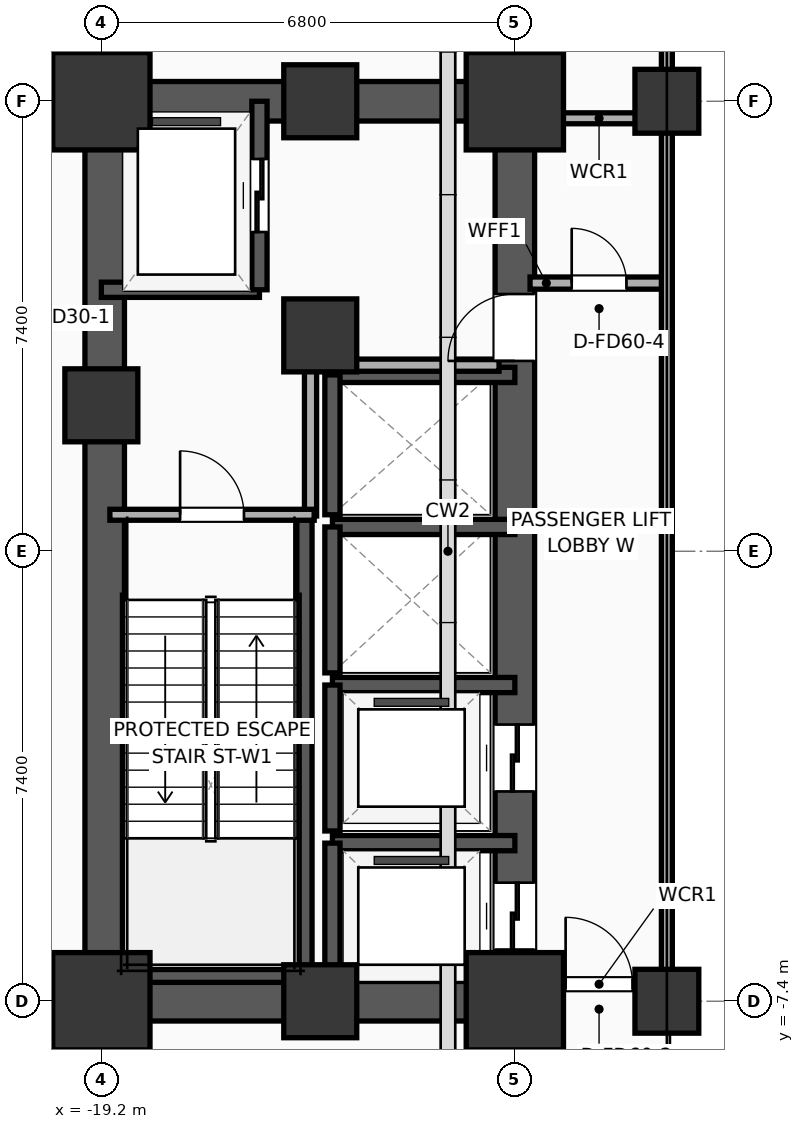
"""IFC4 building model, lengths in metres.
Left out: names, types, materials, properties, quantities, classifications, styles, units other than length and angle.
Written with IfcOpenShell. Run it as: python <this file> out.ifc"""

import sys

from ifc_helpers import new_model, si_unit, direction, frame, frame_2d, origin, origin_2d, place, context, subcontext, project, spatial, rectangle, extrude, element, fill, save


model = new_model("IFC4")
c1 = context("Model", 3, precision=1e-05, world=origin(), true_north=direction((0.0, 1.0)))
c2 = subcontext(c1, "Body", "Model", "MODEL_VIEW")
j1 = project(units=[si_unit("LENGTHUNIT", "METRE"), si_unit("PLANEANGLEUNIT", "RADIAN")], contexts=[c1])
p1 = place(None, origin())
s1 = spatial("IfcSite", under=j1, at=p1, CompositionType="ELEMENT")
p2 = place(p1, origin())
s2 = spatial("IfcBuilding", under=s1, at=p2, CompositionType="ELEMENT")
p3 = place(p2, frame((0.0, 0.0, 15.6)))
s3 = spatial("IfcBuildingStorey", under=s2, at=p3, CompositionType="ELEMENT", Elevation=15.6)
p4 = place(p3, frame((-19.2, -7.4, 0.0), z_axis=(0.0, 0.0, 1.0), x_axis=(1.0, 0.0, 0.0)))
e1 = element("IfcColumn", 1, at=p4, inside=s3, PredefinedType="COLUMN", context=c2, shape_type="SweptSolid", body=[
    extrude(rectangle(XDim=1.6, YDim=1.6, at=origin_2d()), origin(), (0.0, 0.0, 1.0), 5.2),
])
p5 = place(p3, frame((-19.2, 2.4, 0.0), z_axis=(0.0, 0.0, 1.0), x_axis=(1.0, 0.0, 0.0)))
e2 = element("IfcColumn", 2, at=p5, inside=s3, PredefinedType="COLUMN", context=c2, shape_type="SweptSolid", body=[
    extrude(rectangle(XDim=1.2, YDim=1.2, at=origin_2d()), origin(), (0.0, 0.0, 1.0), 5.2),
])
p6 = place(p3, frame((-19.2, 7.4, 0.0), z_axis=(0.0, 0.0, 1.0), x_axis=(1.0, 0.0, 0.0)))
e3 = element("IfcColumn", 3, at=p6, inside=s3, PredefinedType="COLUMN", context=c2, shape_type="SweptSolid", body=[
    extrude(rectangle(XDim=1.6, YDim=1.6, at=origin_2d()), origin(), (0.0, 0.0, 1.0), 5.2),
])
for number, where, z_axis, x_axis in (
    (4, (-15.6, -7.4, 0.0), (0.0, 0.0, 1.0), (1.0, 0.0, 0.0)),
    (5, (-15.6, 7.4, 0.0), (0.0, 0.0, 1.0), (1.0, 0.0, 0.0)),
):
    element("IfcColumn", number, at=place(p3, frame(where, z_axis=z_axis, x_axis=x_axis)), inside=s3, PredefinedType="COLUMN", context=c2, shape_type="SweptSolid", body=[
        extrude(rectangle(XDim=1.2, YDim=1.2, at=origin_2d()), origin(), (0.0, 0.0, 1.0), 5.2),
    ])
p7 = place(p3, frame((-12.4, -7.4, 0.0), z_axis=(0.0, 0.0, 1.0), x_axis=(1.0, 0.0, 0.0)))
e6 = element("IfcColumn", 6, at=p7, inside=s3, PredefinedType="COLUMN", context=c2, shape_type="SweptSolid", body=[
    extrude(rectangle(XDim=1.6, YDim=1.6, at=origin_2d()), origin(), (0.0, 0.0, 1.0), 5.2),
])
p8 = place(p3, frame((-15.6, 3.55, 0.0), z_axis=(0.0, 0.0, 1.0), x_axis=(1.0, 0.0, 0.0)))
e7 = element("IfcColumn", 7, at=p8, inside=s3, PredefinedType="COLUMN", context=c2, shape_type="SweptSolid", body=[
    extrude(rectangle(XDim=1.2, YDim=1.2, at=origin_2d()), origin(), (0.0, 0.0, 1.0), 5.2),
])
p9 = place(p3, frame((-12.4, 7.4, 0.0), z_axis=(0.0, 0.0, 1.0), x_axis=(1.0, 0.0, 0.0)))
e8 = element("IfcColumn", 8, at=p9, inside=s3, PredefinedType="COLUMN", context=c2, shape_type="SweptSolid", body=[
    extrude(rectangle(XDim=1.6, YDim=1.6, at=origin_2d()), origin(), (0.0, 0.0, 1.0), 5.2),
])
for number, where, z_axis, x_axis in (
    (9, (-19.525, -7.4, 0.0), (0.0, 0.0, 1.0), (1.0, 0.0, 0.0)),
    (10, (-19.525, 7.4, 0.0), (0.0, 0.0, 1.0), (1.0, 0.0, 0.0)),
):
    element("IfcWall", number, at=place(p3, frame(where, z_axis=z_axis, x_axis=x_axis)), inside=s3, PredefinedType="SHEAR", context=c2, shape_type="SweptSolid", body=[
        extrude(rectangle(XDim=7.45, YDim=0.65, at=frame_2d((3.725, 0.0))), origin(), (0.0, 0.0, 1.0), 4.8),
    ])
p10 = place(p3, frame((-19.145, -7.4, 0.0), z_axis=(0.0, 0.0, 1.0), x_axis=(0.0, 1.0, 0.0)))
e11 = element("IfcWall", 11, at=p10, inside=s3, PredefinedType="SHEAR", context=c2, shape_type="SweptSolid", body=[
    extrude(rectangle(XDim=14.8, YDim=0.65, at=frame_2d((7.4, 0.0))), origin(), (0.0, 0.0, 1.0), 4.8),
])
p11 = place(p3, frame((-12.4, -7.4, 0.0), z_axis=(0.0, 0.0, 1.0), x_axis=(0.0, 1.0, 0.0)))
e12 = element("IfcWall", 12, at=p11, inside=s3, PredefinedType="SHEAR", context=c2, shape_type="SweptSolid", body=[
    extrude(rectangle(XDim=14.8, YDim=0.65, at=frame_2d((7.4, 0.0))), origin(), (0.0, 0.0, 1.0), 4.8),
])
p12 = place(p11, frame((0.85, 0.0, 0.0)))
e13 = element("IfcOpeningElement", 13, at=p12, cuts=e12, PredefinedType="OPENING", context=c2, shape_type="SweptSolid", body=[
    extrude(rectangle(XDim=1.1, YDim=2.05, at=frame_2d((0.55, 1.025))), frame((0.0, 0.335, 0.0), z_axis=(0.0, -1.0, 0.0), x_axis=(1.0, 0.0, 0.0)), (0.0, 0.0, 1.0), 0.67),
])
p13 = place(p11, frame((3.45, 0.0, 0.0)))
e14 = element("IfcOpeningElement", 14, at=p13, cuts=e12, PredefinedType="OPENING", context=c2, shape_type="SweptSolid", body=[
    extrude(rectangle(XDim=1.1, YDim=2.05, at=frame_2d((0.55, 1.025))), frame((0.0, 0.335, 0.0), z_axis=(0.0, -1.0, 0.0), x_axis=(1.0, 0.0, 0.0)), (0.0, 0.0, 1.0), 0.67),
])
p14 = place(p11, frame((10.53, 0.0, 0.0)))
e15 = element("IfcOpeningElement", 15, at=p14, cuts=e12, PredefinedType="OPENING", context=c2, shape_type="SweptSolid", body=[
    extrude(rectangle(XDim=1.1, YDim=2.05, at=frame_2d((0.55, 1.025))), frame((0.0, 0.335, 0.0), z_axis=(0.0, -1.0, 0.0), x_axis=(1.0, 0.0, 0.0)), (0.0, 0.0, 1.0), 0.67),
])
p15 = place(p3, frame((-15.86, -7.085, 0.0), z_axis=(0.0, 0.0, 1.0), x_axis=(0.0, 1.0, 0.0)))
e16 = element("IfcWall", 16, at=p15, inside=s3, PredefinedType="SOLIDWALL", context=c2, shape_type="SweptSolid", body=[
    extrude(rectangle(XDim=7.685, YDim=0.25, at=frame_2d((3.843, 0.0))), origin(), (0.0, 0.0, 1.0), 4.8),
])
p16 = place(p3, frame((-19.2, -6.965, 0.0), z_axis=(0.0, 0.0, 1.0), x_axis=(1.0, 0.0, 0.0)))
e17 = element("IfcWall", 17, at=p16, inside=s3, PredefinedType="SOLIDWALL", context=c2, shape_type="SweptSolid", body=[
    extrude(rectangle(XDim=3.46, YDim=0.25, at=frame_2d((1.73, 0.0))), origin(), (0.0, 0.0, 1.0), 4.8),
])
for number, where, z_axis, x_axis in (
    (18, (-9.9, -7.4, 0.0), (0.0, 0.0, 1.0), (1.0, 0.0, 0.0)),
    (19, (-9.9, 7.4, 0.0), (0.0, 0.0, 1.0), (1.0, 0.0, 0.0)),
):
    element("IfcColumn", number, at=place(p3, frame(where, z_axis=z_axis, x_axis=x_axis)), inside=s3, PredefinedType="COLUMN", context=c2, shape_type="SweptSolid", body=[
        extrude(rectangle(XDim=1.05, YDim=1.05, at=origin_2d()), origin(), (0.0, 0.0, 1.0), 5.2),
    ])
p17 = place(p3, frame((-19.2, 4.3, 0.0), z_axis=(0.0, 0.0, 1.0), x_axis=(1.0, 0.0, 0.0)))
e20 = element("IfcWall", 20, at=p17, inside=s3, PredefinedType="SOLIDWALL", context=c2, shape_type="SweptSolid", body=[
    extrude(rectangle(XDim=2.6, YDim=0.25, at=frame_2d((1.3, 0.0))), origin(), (0.0, 0.0, 1.0), 4.8),
])
p18 = place(p3, frame((-16.6, 4.3, 0.0), z_axis=(0.0, 0.0, 1.0), x_axis=(0.0, 1.0, 0.0)))
e21 = element("IfcWall", 21, at=p18, inside=s3, PredefinedType="SOLIDWALL", context=c2, shape_type="SweptSolid", body=[
    extrude(rectangle(XDim=3.1, YDim=0.25, at=frame_2d((1.55, 0.0))), origin(), (0.0, 0.0, 1.0), 4.8),
])
p19 = place(p18, frame((0.95, 0.0, 0.0)))
e22 = element("IfcOpeningElement", 22, at=p19, cuts=e21, PredefinedType="OPENING", context=c2, shape_type="SweptSolid", body=[
    extrude(rectangle(XDim=1.2, YDim=2.05, at=frame_2d((0.6, 1.025))), frame((0.0, 0.135, 0.0), z_axis=(0.0, -1.0, 0.0), x_axis=(1.0, 0.0, 0.0)), (0.0, 0.0, 1.0), 0.27),
])
p20 = place(p3, frame((-12.4, -4.8, 0.0), z_axis=(0.0, 0.0, 1.0), x_axis=(-1.0, 0.0, 0.0)))
e23 = element("IfcWall", 23, at=p20, inside=s3, PredefinedType="SOLIDWALL", context=c2, shape_type="SweptSolid", body=[
    extrude(rectangle(XDim=3.0, YDim=0.25, at=frame_2d((1.5, 0.0))), origin(), (0.0, 0.0, 1.0), 4.8),
])
p21 = place(p3, frame((-15.4, -4.8, 0.0), z_axis=(0.0, 0.0, 1.0), x_axis=(0.0, -1.0, 0.0)))
e24 = element("IfcWall", 24, at=p21, inside=s3, PredefinedType="SOLIDWALL", context=c2, shape_type="SweptSolid", body=[
    extrude(rectangle(XDim=2.6, YDim=0.25, at=frame_2d((1.3, 0.0))), origin(), (0.0, 0.0, 1.0), 4.8),
])
p22 = place(p3, frame((-12.4, -2.2, 0.0), z_axis=(0.0, 0.0, 1.0), x_axis=(-1.0, 0.0, 0.0)))
e25 = element("IfcWall", 25, at=p22, inside=s3, PredefinedType="SOLIDWALL", context=c2, shape_type="SweptSolid", body=[
    extrude(rectangle(XDim=3.0, YDim=0.25, at=frame_2d((1.5, 0.0))), origin(), (0.0, 0.0, 1.0), 4.8),
])
p23 = place(p3, frame((-15.4, -2.2, 0.0), z_axis=(0.0, 0.0, 1.0), x_axis=(0.0, -1.0, 0.0)))
e26 = element("IfcWall", 26, at=p23, inside=s3, PredefinedType="SOLIDWALL", context=c2, shape_type="SweptSolid", body=[
    extrude(rectangle(XDim=2.4, YDim=0.25, at=frame_2d((1.2, 0.0))), origin(), (0.0, 0.0, 1.0), 4.8),
])
p24 = place(p3, frame((-12.4, 0.4, 0.0), z_axis=(0.0, 0.0, 1.0), x_axis=(-1.0, 0.0, 0.0)))
e27 = element("IfcWall", 27, at=p24, inside=s3, PredefinedType="SOLIDWALL", context=c2, shape_type="SweptSolid", body=[
    extrude(rectangle(XDim=3.0, YDim=0.25, at=frame_2d((1.5, 0.0))), origin(), (0.0, 0.0, 1.0), 4.8),
])
p25 = place(p3, frame((-15.4, 0.4, 0.0), z_axis=(0.0, 0.0, 1.0), x_axis=(0.0, -1.0, 0.0)))
e28 = element("IfcWall", 28, at=p25, inside=s3, PredefinedType="SOLIDWALL", context=c2, shape_type="SweptSolid", body=[
    extrude(rectangle(XDim=2.4, YDim=0.25, at=frame_2d((1.2, 0.0))), origin(), (0.0, 0.0, 1.0), 4.8),
])
p26 = place(p3, frame((-12.4, 2.9, 0.0), z_axis=(0.0, 0.0, 1.0), x_axis=(-1.0, 0.0, 0.0)))
e29 = element("IfcWall", 29, at=p26, inside=s3, PredefinedType="SOLIDWALL", context=c2, shape_type="SweptSolid", body=[
    extrude(rectangle(XDim=3.0, YDim=0.25, at=frame_2d((1.5, 0.0))), origin(), (0.0, 0.0, 1.0), 4.8),
])
p27 = place(p3, frame((-15.4, 2.9, 0.0), z_axis=(0.0, 0.0, 1.0), x_axis=(0.0, -1.0, 0.0)))
e30 = element("IfcWall", 30, at=p27, inside=s3, PredefinedType="SOLIDWALL", context=c2, shape_type="SweptSolid", body=[
    extrude(rectangle(XDim=2.3, YDim=0.25, at=frame_2d((1.15, 0.0))), origin(), (0.0, 0.0, 1.0), 4.8),
])
p28 = place(p3, frame((-15.76, 0.58, 0.0), z_axis=(0.0, 0.0, 1.0), x_axis=(0.0, 1.0, 0.0)))
e31 = element("IfcWall", 31, at=p28, inside=s3, PredefinedType="PARTITIONING", context=c2, shape_type="SweptSolid", body=[
    extrude(rectangle(XDim=2.52, YDim=0.2, at=frame_2d((1.26, 0.0))), origin(), (0.0, 0.0, 1.0), 4.8),
])
p29 = place(p3, frame((-15.82, 3.06, 0.0), z_axis=(0.0, 0.0, 1.0), x_axis=(1.0, 0.0, 0.0)))
e32 = element("IfcWall", 32, at=p29, inside=s3, PredefinedType="PARTITIONING", context=c2, shape_type="SweptSolid", body=[
    extrude(rectangle(XDim=3.16, YDim=0.2, at=frame_2d((1.58, 0.0))), origin(), (0.0, 0.0, 1.0), 4.8),
])
p30 = place(p3, frame((-19.06, 0.6, 0.0), z_axis=(0.0, 0.0, 1.0), x_axis=(1.0, 0.0, 0.0)))
e33 = element("IfcWall", 33, at=p30, inside=s3, PredefinedType="PARTITIONING", context=c2, shape_type="SweptSolid", body=[
    extrude(rectangle(XDim=3.36, YDim=0.18, at=frame_2d((1.68, 0.0))), origin(), (0.0, 0.0, 1.0), 4.8),
])
p31 = place(p30, frame((1.155, 0.0, 0.0)))
e34 = element("IfcOpeningElement", 34, at=p31, cuts=e33, PredefinedType="OPENING", context=c2, shape_type="SweptSolid", body=[
    extrude(rectangle(XDim=1.05, YDim=2.05, at=frame_2d((0.525, 1.025))), frame((0.0, 0.1, 0.0), z_axis=(0.0, -1.0, 0.0), x_axis=(1.0, 0.0, 0.0)), (0.0, 0.0, 1.0), 0.2),
])
p32 = place(p3, frame((-12.15, 4.41, 0.0), z_axis=(0.0, 0.0, 1.0), x_axis=(1.0, 0.0, 0.0)))
e35 = element("IfcWall", 35, at=p32, inside=s3, PredefinedType="PARTITIONING", context=c2, shape_type="SweptSolid", body=[
    extrude(rectangle(XDim=2.27, YDim=0.2, at=frame_2d((1.135, 0.0))), origin(), (0.0, 0.0, 1.0), 4.8),
])
p33 = place(p32, frame((0.685, 0.0, 0.0)))
e36 = element("IfcOpeningElement", 36, at=p33, cuts=e35, PredefinedType="OPENING", context=c2, shape_type="SweptSolid", body=[
    extrude(rectangle(XDim=0.9, YDim=2.05, at=frame_2d((0.45, 1.025))), frame((0.0, 0.11, 0.0), z_axis=(0.0, -1.0, 0.0), x_axis=(1.0, 0.0, 0.0)), (0.0, 0.0, 1.0), 0.22),
])
p34 = place(p3, frame((-12.15, 7.12, 0.0), z_axis=(0.0, 0.0, 1.0), x_axis=(1.0, 0.0, 0.0)))
e37 = element("IfcWall", 37, at=p34, inside=s3, PredefinedType="PARTITIONING", context=c2, shape_type="SweptSolid", body=[
    extrude(rectangle(XDim=2.27, YDim=0.18, at=frame_2d((1.135, 0.0))), origin(), (0.0, 0.0, 1.0), 4.09),
])
p35 = place(p3, frame((-12.15, -7.12, 0.0), z_axis=(0.0, 0.0, 1.0), x_axis=(1.0, 0.0, 0.0)))
e38 = element("IfcWall", 38, at=p35, inside=s3, PredefinedType="PARTITIONING", context=c2, shape_type="SweptSolid", body=[
    extrude(rectangle(XDim=2.27, YDim=0.18, at=frame_2d((1.135, 0.0))), origin(), (0.0, 0.0, 1.0), 4.09),
])
p36 = place(p35, frame((0.585, 0.0, 0.0)))
e39 = element("IfcOpeningElement", 39, at=p36, cuts=e38, PredefinedType="OPENING", context=c2, shape_type="SweptSolid", body=[
    extrude(rectangle(XDim=1.1, YDim=2.05, at=frame_2d((0.55, 1.025))), frame((0.0, 0.1, 0.0), z_axis=(0.0, -1.0, 0.0), x_axis=(1.0, 0.0, 0.0)), (0.0, 0.0, 1.0), 0.2),
])
p37 = place(p3, frame((-9.9, -7.12, 0.0), z_axis=(0.0, 0.0, 1.0), x_axis=(0.0, 1.0, 0.0)))
e40 = element("IfcWall", 40, at=p37, inside=s3, PredefinedType="PARTITIONING", context=c2, shape_type="SweptSolid", body=[
    extrude(rectangle(XDim=16.82, YDim=0.18, at=frame_2d((8.41, 0.0))), origin(), (0.0, 0.0, 1.0), 4.09),
])
p38 = place(p19, origin())
e41 = element("IfcDoor", 41, at=p38, inside=s3, OperationType="SLIDING_TO_LEFT", PredefinedType="DOOR", context=c2, shape_type="SweptSolid", body=[
    extrude(rectangle(XDim=1.2, YDim=2.05, at=frame_2d((0.6, 1.025))), frame((0.0, 0.025, 0.0), z_axis=(0.0, -1.0, 0.0), x_axis=(1.0, 0.0, 0.0)), (0.0, 0.0, 1.0), 0.05),
])
fill(e22, e41)
p39 = place(p12, origin())
e42 = element("IfcDoor", 42, at=p39, inside=s3, OperationType="SLIDING_TO_LEFT", PredefinedType="DOOR", context=c2, shape_type="SweptSolid", body=[
    extrude(rectangle(XDim=1.1, YDim=2.05, at=frame_2d((0.55, 1.025))), frame((0.0, 0.025, 0.0), z_axis=(0.0, -1.0, 0.0), x_axis=(1.0, 0.0, 0.0)), (0.0, 0.0, 1.0), 0.05),
])
fill(e13, e42)
p40 = place(p13, origin())
e43 = element("IfcDoor", 43, at=p40, inside=s3, OperationType="SLIDING_TO_LEFT", PredefinedType="DOOR", context=c2, shape_type="SweptSolid", body=[
    extrude(rectangle(XDim=1.1, YDim=2.05, at=frame_2d((0.55, 1.025))), frame((0.0, 0.025, 0.0), z_axis=(0.0, -1.0, 0.0), x_axis=(1.0, 0.0, 0.0)), (0.0, 0.0, 1.0), 0.05),
])
fill(e14, e43)
p41 = place(p31, origin())
e44 = element("IfcDoor", 44, at=p41, inside=s3, OperationType="SINGLE_SWING_LEFT", PredefinedType="DOOR", context=c2, shape_type="SweptSolid", body=[
    extrude(rectangle(XDim=1.05, YDim=2.05, at=frame_2d((0.525, 1.025))), frame((0.0, 0.025, 0.0), z_axis=(0.0, -1.0, 0.0), x_axis=(1.0, 0.0, 0.0)), (0.0, 0.0, 1.0), 0.05),
])
fill(e34, e44)
p42 = place(p33, origin())
e45 = element("IfcDoor", 45, at=p42, inside=s3, OperationType="SINGLE_SWING_LEFT", PredefinedType="DOOR", context=c2, shape_type="SweptSolid", body=[
    extrude(rectangle(XDim=0.9, YDim=2.05, at=frame_2d((0.45, 1.025))), frame((0.0, 0.025, 0.0), z_axis=(0.0, -1.0, 0.0), x_axis=(1.0, 0.0, 0.0)), (0.0, 0.0, 1.0), 0.05),
])
fill(e36, e45)
p43 = place(p36, origin())
e46 = element("IfcDoor", 46, at=p43, inside=s3, OperationType="SINGLE_SWING_LEFT", PredefinedType="DOOR", context=c2, shape_type="SweptSolid", body=[
    extrude(rectangle(XDim=1.1, YDim=2.05, at=frame_2d((0.55, 1.025))), frame((0.0, 0.025, 0.0), z_axis=(0.0, -1.0, 0.0), x_axis=(1.0, 0.0, 0.0)), (0.0, 0.0, 1.0), 0.05),
])
fill(e39, e46)
p44 = place(p14, origin())
e47 = element("IfcDoor", 47, at=p44, inside=s3, OperationType="SINGLE_SWING_LEFT", PredefinedType="DOOR", context=c2, shape_type="SweptSolid", body=[
    extrude(rectangle(XDim=1.1, YDim=2.05, at=frame_2d((0.55, 1.025))), frame((0.0, 0.025, 0.0), z_axis=(0.0, -1.0, 0.0), x_axis=(1.0, 0.0, 0.0)), (0.0, 0.0, 1.0), 0.05),
])
fill(e15, e47)
save(model, sys.argv[1])
